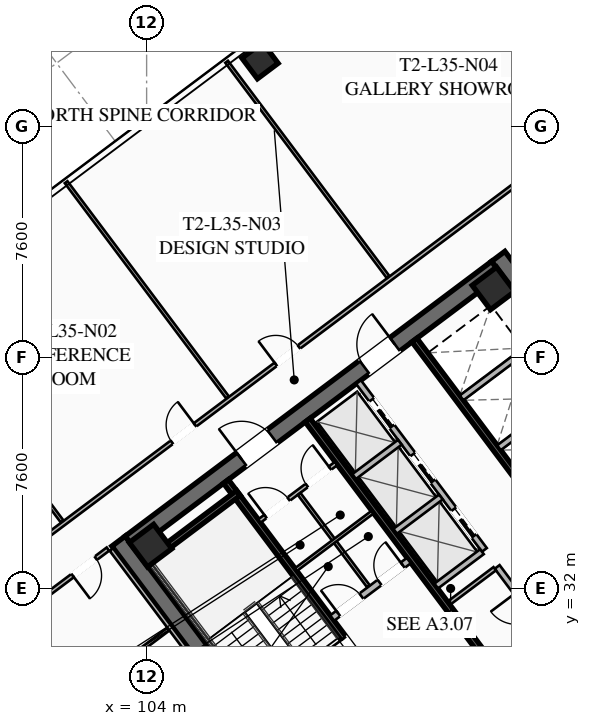
"""IFC4 building model, lengths in metres.
Left out: names, types, materials, properties, quantities, classifications, styles, units other than length and angle.
Written with IfcOpenShell. Run it as: python <this file> out.ifc"""

import sys

from ifc_helpers import new_model, si_unit, direction, frame, frame_2d, origin, origin_2d, place, context, subcontext, project, spatial, rectangle, hollow_rectangle, extrude, element, fill, save


model = new_model("IFC4")
c1 = context("Model", 3, precision=1e-05, world=origin(), true_north=direction((0.0, 1.0)))
c2 = subcontext(c1, "Body", "Model", "MODEL_VIEW")
j1 = project(units=[si_unit("LENGTHUNIT", "METRE"), si_unit("PLANEANGLEUNIT", "RADIAN")], contexts=[c1])
p1 = place(None, origin())
s1 = spatial("IfcSite", under=j1, at=p1, CompositionType="ELEMENT")
p2 = place(p1, origin())
s2 = spatial("IfcBuilding", under=s1, at=p2, CompositionType="ELEMENT")
p3 = place(p2, frame((0.0, 0.0, 132.15)))
s3 = spatial("IfcBuildingStorey", under=s2, at=p3, CompositionType="ELEMENT", Elevation=132.15)
for number, where, z_axis, x_axis in (
    (1, (112.436, 21.077, 0.0), (0.0, 0.0, 1.0), (-0.6, 0.8, 0.0)),
    (2, (115.564, 42.923, 0.0), (0.0, 0.0, 1.0), (0.6, -0.8, 0.0)),
):
    element("IfcWall", number, at=place(p3, frame(where, z_axis=z_axis, x_axis=x_axis)), inside=s3, PredefinedType="SHEAR", context=c2, shape_type="SweptSolid", body=[
        extrude(rectangle(XDim=15.6, YDim=0.55, at=frame_2d((7.8, 0.0))), origin(), (0.0, 0.0, 1.0), 3.55),
    ])
p4 = place(p3, frame((124.539, 30.498, 0.0), z_axis=(0.0, 0.0, 1.0), x_axis=(-0.799998054672, -0.600002593761, 0.0)))
e3 = element("IfcWall", 3, at=p4, inside=s3, PredefinedType="SHEAR", context=c2, shape_type="SweptSolid", body=[
    extrude(rectangle(XDim=15.06, YDim=0.55, at=frame_2d((7.53, 0.0))), origin(), (0.0, 0.0, 1.0), 3.55),
])
p5 = place(p4, frame((9.23, 0.0, 0.0)))
e4 = element("IfcOpeningElement", 4, at=p5, cuts=e3, PredefinedType="OPENING", context=c2, shape_type="SweptSolid", body=[
    extrude(rectangle(XDim=1.25, YDim=2.25, at=frame_2d((0.625, 1.125))), frame((0.0, 0.285, 0.0), z_axis=(0.0, -1.0, 0.0), x_axis=(1.0, 0.0, 0.0)), (0.0, 0.0, 1.0), 0.57),
])
p6 = place(p4, frame((4.18, 0.0, 0.0)))
e5 = element("IfcOpeningElement", 5, at=p6, cuts=e3, PredefinedType="OPENING", context=c2, shape_type="SweptSolid", body=[
    extrude(rectangle(XDim=1.25, YDim=2.25, at=frame_2d((0.625, 1.125))), frame((0.0, 0.285, 0.0), z_axis=(0.0, -1.0, 0.0), x_axis=(1.0, 0.0, 0.0)), (0.0, 0.0, 1.0), 0.57),
])
p7 = place(p3, frame((103.461, 33.502, 0.0), z_axis=(0.0, 0.0, 1.0), x_axis=(0.799998054672, 0.600002593761, 0.0)))
e6 = element("IfcWall", 6, at=p7, inside=s3, PredefinedType="SHEAR", context=c2, shape_type="SweptSolid", body=[
    extrude(rectangle(XDim=15.06, YDim=0.55, at=frame_2d((7.53, 0.0))), origin(), (0.0, 0.0, 1.0), 3.55),
])
p8 = place(p7, frame((4.58, 0.0, 0.0)))
e7 = element("IfcOpeningElement", 7, at=p8, cuts=e6, PredefinedType="OPENING", context=c2, shape_type="SweptSolid", body=[
    extrude(rectangle(XDim=1.25, YDim=2.25, at=frame_2d((0.625, 1.125))), frame((0.0, 0.285, 0.0), z_axis=(0.0, -1.0, 0.0), x_axis=(1.0, 0.0, 0.0)), (0.0, 0.0, 1.0), 0.57),
])
p9 = place(p7, frame((9.63, 0.0, 0.0)))
e8 = element("IfcOpeningElement", 8, at=p9, cuts=e6, PredefinedType="OPENING", context=c2, shape_type="SweptSolid", body=[
    extrude(rectangle(XDim=1.25, YDim=2.25, at=frame_2d((0.625, 1.125))), frame((0.0, 0.285, 0.0), z_axis=(0.0, -1.0, 0.0), x_axis=(1.0, 0.0, 0.0)), (0.0, 0.0, 1.0), 0.57),
])
for number, where, z_axis, x_axis in (
    (9, (115.41, 41.87, 0.0), (0.0, 0.0, 1.0), (0.8, 0.6, 0.0)),
    (10, (104.13, 33.41, 0.0), (0.0, 0.0, 1.0), (0.8, 0.6, 0.0)),
):
    element("IfcColumn", number, at=place(p3, frame(where, z_axis=z_axis, x_axis=x_axis)), inside=s3, PredefinedType="COLUMN", context=c2, shape_type="SweptSolid", body=[
        extrude(hollow_rectangle(XDim=1.0, YDim=1.0, WallThickness=0.04, at=origin_2d()), origin(), (0.0, 0.0, 1.0), 3.37),
    ])
p10 = place(p3, frame((107.73, 49.36, 0.0), z_axis=(0.0, 0.0, 1.0), x_axis=(0.799999996291, 0.600000004945, 0.0)))
e11 = element("IfcColumn", 11, at=p10, inside=s3, PredefinedType="COLUMN", context=c2, shape_type="SweptSolid", body=[
    extrude(hollow_rectangle(XDim=0.85, YDim=0.85, WallThickness=0.035, at=origin_2d()), origin(), (0.0, 0.0, 1.0), 3.37),
])
p11 = place(p3, frame((111.44, 29.08, 0.0), z_axis=(0.0, 0.0, 1.0), x_axis=(-0.59999029481, 0.8000072788, 0.0)))
e12 = element("IfcWall", 12, at=p11, inside=s3, PredefinedType="SHEAR", context=c2, shape_type="SweptSolid", body=[
    extrude(rectangle(XDim=8.05, YDim=0.2, at=frame_2d((4.025, 0.0))), origin(), (0.0, 0.0, 1.0), 3.37),
])
p12 = place(p11, frame((0.45, 0.0, 0.0)))
e13 = element("IfcOpeningElement", 13, at=p12, cuts=e12, PredefinedType="OPENING", context=c2, shape_type="SweptSolid", body=[
    extrude(rectangle(XDim=1.15, YDim=2.2, at=frame_2d((0.575, 1.1))), frame((0.0, 0.11, 0.0), z_axis=(0.0, -1.0, 0.0), x_axis=(1.0, 0.0, 0.0)), (0.0, 0.0, 1.0), 0.22),
])
p13 = place(p3, frame((103.956, 32.842, 0.0), z_axis=(0.0, 0.0, 1.0), x_axis=(0.800015298837, 0.599979601008, 0.0)))
e14 = element("IfcWall", 14, at=p13, inside=s3, PredefinedType="SHEAR", context=c2, shape_type="SweptSolid", body=[
    extrude(rectangle(XDim=3.83, YDim=0.2, at=frame_2d((1.915, 0.0))), origin(), (0.0, 0.0, 1.0), 3.37),
])
p14 = place(p3, frame((117.998, 25.936, 0.0), z_axis=(0.0, 0.0, 1.0), x_axis=(-0.600002693989, 0.799997979501, 0.0)))
e15 = element("IfcWall", 15, at=p14, inside=s3, PredefinedType="SHEAR", context=c2, shape_type="SweptSolid", body=[
    extrude(rectangle(XDim=14.5, YDim=0.2, at=frame_2d((7.25, 0.0))), origin(), (0.0, 0.0, 1.0), 3.37),
])
p15 = place(p3, frame((110.104, 31.028, 0.0), z_axis=(0.0, 0.0, 1.0), x_axis=(0.800018601094, 0.59997519774, 0.0)))
e16 = element("IfcWall", 16, at=p15, inside=s3, PredefinedType="SOLIDWALL", context=c2, shape_type="SweptSolid", body=[
    extrude(rectangle(XDim=3.15, YDim=0.22, at=frame_2d((1.575, 0.0))), origin(), (0.0, 0.0, 1.0), 2.723),
])
p16 = place(p15, frame((0.25, 0.0, 0.0)))
e17 = element("IfcOpeningElement", 17, at=p16, cuts=e16, PredefinedType="OPENING", context=c2, shape_type="SweptSolid", body=[
    extrude(rectangle(XDim=0.95, YDim=2.05, at=frame_2d((0.475, 1.025))), frame((0.0, 0.12, 0.0), z_axis=(0.0, -1.0, 0.0), x_axis=(1.0, 0.0, 0.0)), (0.0, 0.0, 1.0), 0.24),
])
p17 = place(p15, frame((1.95, 0.0, 0.0)))
e18 = element("IfcOpeningElement", 18, at=p17, cuts=e16, PredefinedType="OPENING", context=c2, shape_type="SweptSolid", body=[
    extrude(rectangle(XDim=0.95, YDim=2.05, at=frame_2d((0.475, 1.025))), frame((0.0, 0.12, 0.0), z_axis=(0.0, -1.0, 0.0), x_axis=(1.0, 0.0, 0.0)), (0.0, 0.0, 1.0), 0.24),
])
p18 = place(p3, frame((112.81, 40.17, 0.0), z_axis=(0.0, 0.0, 1.0), x_axis=(0.599993943644, -0.800004542231, 0.0)))
e19 = element("IfcWall", 19, at=p18, inside=s3, PredefinedType="SHEAR", context=c2, shape_type="SweptSolid", body=[
    extrude(rectangle(XDim=6.45, YDim=0.2, at=frame_2d((3.225, 0.0))), origin(), (0.0, 0.0, 1.0), 3.37),
])
for number, where, z_axis, x_axis in (
    (20, (115.59, 36.63, 0.0), (0.0, 0.0, 1.0), (0.8, 0.6, 0.0)),
    (21, (114.36, 38.27, 0.0), (0.0, 0.0, 1.0), (0.8, 0.6, 0.0)),
):
    element("IfcWall", number, at=place(p3, frame(where, z_axis=z_axis, x_axis=x_axis)), inside=s3, PredefinedType="SOLIDWALL", context=c2, shape_type="SweptSolid", body=[
        extrude(rectangle(XDim=3.48, YDim=0.2, at=frame_2d((1.74, 0.0))), origin(), (0.0, 0.0, 1.0), 3.37),
    ])
p19 = place(p3, frame((107.71, 34.22, 0.0), z_axis=(0.0, 0.0, 1.0), x_axis=(0.799981399002, 0.60002480053, 0.0)))
e22 = element("IfcWall", 22, at=p19, inside=s3, PredefinedType="PARTITIONING", context=c2, shape_type="SweptSolid", body=[
    extrude(rectangle(XDim=3.15, YDim=0.135, at=frame_2d((1.575, 0.0))), origin(), (0.0, 0.0, 1.0), 2.723),
])
p20 = place(p19, frame((0.25, 0.0, 0.0)))
e23 = element("IfcOpeningElement", 23, at=p20, cuts=e22, PredefinedType="OPENING", context=c2, shape_type="SweptSolid", body=[
    extrude(rectangle(XDim=0.95, YDim=2.05, at=frame_2d((0.475, 1.025))), frame((0.0, 0.077, 0.0), z_axis=(0.0, -1.0, 0.0), x_axis=(1.0, 0.0, 0.0)), (0.0, 0.0, 1.0), 0.155),
])
p21 = place(p19, frame((1.95, 0.0, 0.0)))
e24 = element("IfcOpeningElement", 24, at=p21, cuts=e22, PredefinedType="OPENING", context=c2, shape_type="SweptSolid", body=[
    extrude(rectangle(XDim=0.95, YDim=2.05, at=frame_2d((0.475, 1.025))), frame((0.0, 0.077, 0.0), z_axis=(0.0, -1.0, 0.0), x_axis=(1.0, 0.0, 0.0)), (0.0, 0.0, 1.0), 0.155),
])
p22 = place(p3, frame((111.296, 32.072, 0.0), z_axis=(0.0, 0.0, 1.0), x_axis=(-0.59995887973, 0.800030838552, 0.0)))
e25 = element("IfcWall", 25, at=p22, inside=s3, PredefinedType="PARTITIONING", context=c2, shape_type="SweptSolid", body=[
    extrude(rectangle(XDim=3.8, YDim=0.11, at=frame_2d((1.9, 0.0))), origin(), (0.0, 0.0, 1.0), 2.723),
])
p23 = place(p3, frame((108.91, 32.62, 0.0), z_axis=(0.0, 0.0, 1.0), x_axis=(0.800018601094, 0.59997519774, 0.0)))
e26 = element("IfcWall", 26, at=p23, inside=s3, PredefinedType="PARTITIONING", context=c2, shape_type="SweptSolid", body=[
    extrude(rectangle(XDim=3.15, YDim=0.11, at=frame_2d((1.575, 0.0))), origin(), (0.0, 0.0, 1.0), 2.723),
])
p24 = place(p3, frame((119.67, 27.19, 0.0), z_axis=(0.0, 0.0, 1.0), x_axis=(-0.599988677396, 0.800008491828, 0.0)))
e27 = element("IfcWall", 27, at=p24, inside=s3, PredefinedType="SOLIDWALL", context=c2, shape_type="SweptSolid", body=[
    extrude(rectangle(XDim=6.9, YDim=0.2, at=frame_2d((3.45, 0.0))), origin(), (0.0, 0.0, 1.0), 2.723),
])
p25 = place(p24, frame((0.85, 0.0, 0.0)))
e28 = element("IfcOpeningElement", 28, at=p25, cuts=e27, PredefinedType="OPENING", context=c2, shape_type="SweptSolid", body=[
    extrude(rectangle(XDim=0.95, YDim=2.05, at=frame_2d((0.475, 1.025))), frame((0.0, 0.11, 0.0), z_axis=(0.0, -1.0, 0.0), x_axis=(1.0, 0.0, 0.0)), (0.0, 0.0, 1.0), 0.22),
])
p26 = place(p24, frame((4.8, 0.0, 0.0)))
e29 = element("IfcOpeningElement", 29, at=p26, cuts=e27, PredefinedType="OPENING", context=c2, shape_type="SweptSolid", body=[
    extrude(rectangle(XDim=1.05, YDim=2.2, at=frame_2d((0.525, 1.1))), frame((0.0, 0.11, 0.0), z_axis=(0.0, -1.0, 0.0), x_axis=(1.0, 0.0, 0.0)), (0.0, 0.0, 1.0), 0.22),
])
p27 = place(p3, frame((113.946, 31.522, 0.0), z_axis=(0.0, 0.0, 1.0), x_axis=(0.8, 0.6, 0.0)))
e30 = element("IfcWall", 30, at=p27, inside=s3, PredefinedType="PARTITIONING", context=c2, shape_type="SweptSolid", body=[
    extrude(rectangle(XDim=1.88, YDim=0.135, at=frame_2d((0.94, 0.0))), origin(), (0.0, 0.0, 1.0), 2.723),
])
p28 = place(p3, frame((115.11, 33.27, 0.0), z_axis=(0.0, 0.0, 1.0), x_axis=(-0.600011322243, 0.799991508192, 0.0)))
e31 = element("IfcWall", 31, at=p28, inside=s3, PredefinedType="SOLIDWALL", context=c2, shape_type="SweptSolid", body=[
    extrude(rectangle(XDim=6.9, YDim=0.2, at=frame_2d((3.45, 0.0))), origin(), (0.0, 0.0, 1.0), 3.37),
])
p29 = place(p28, frame((0.575, 0.0, 0.0)))
e32 = element("IfcOpeningElement", 32, at=p29, cuts=e31, PredefinedType="OPENING", context=c2, shape_type="SweptSolid", body=[
    extrude(rectangle(XDim=1.1, YDim=2.2, at=frame_2d((0.55, 1.1))), frame((0.0, 0.11, 0.0), z_axis=(0.0, -1.0, 0.0), x_axis=(1.0, 0.0, 0.0)), (0.0, 0.0, 1.0), 0.22),
])
p30 = place(p28, frame((2.825, 0.0, 0.0)))
e33 = element("IfcOpeningElement", 33, at=p30, cuts=e31, PredefinedType="OPENING", context=c2, shape_type="SweptSolid", body=[
    extrude(rectangle(XDim=1.1, YDim=2.2, at=frame_2d((0.55, 1.1))), frame((0.0, 0.11, 0.0), z_axis=(0.0, -1.0, 0.0), x_axis=(1.0, 0.0, 0.0)), (0.0, 0.0, 1.0), 0.22),
])
p31 = place(p28, frame((5.075, 0.0, 0.0)))
e34 = element("IfcOpeningElement", 34, at=p31, cuts=e31, PredefinedType="OPENING", context=c2, shape_type="SweptSolid", body=[
    extrude(rectangle(XDim=1.1, YDim=2.2, at=frame_2d((0.55, 1.1))), frame((0.0, 0.11, 0.0), z_axis=(0.0, -1.0, 0.0), x_axis=(1.0, 0.0, 0.0)), (0.0, 0.0, 1.0), 0.22),
])
p32 = place(p3, frame((113.526, 32.082, 0.0), z_axis=(0.0, 0.0, 1.0), x_axis=(0.800046745961, 0.599937666993, 0.0)))
e35 = element("IfcWall", 35, at=p32, inside=s3, PredefinedType="SOLIDWALL", context=c2, shape_type="SweptSolid", body=[
    extrude(rectangle(XDim=1.88, YDim=0.2, at=frame_2d((0.94, 0.0))), origin(), (0.0, 0.0, 1.0), 3.37),
])
p33 = place(p3, frame((112.176, 33.882, 0.0), z_axis=(0.0, 0.0, 1.0), x_axis=(0.8, 0.6, 0.0)))
e36 = element("IfcWall", 36, at=p33, inside=s3, PredefinedType="SOLIDWALL", context=c2, shape_type="SweptSolid", body=[
    extrude(rectangle(XDim=1.88, YDim=0.2, at=frame_2d((0.94, 0.0))), origin(), (0.0, 0.0, 1.0), 3.37),
])
p34 = place(p3, frame((110.826, 35.682, 0.0), z_axis=(0.0, 0.0, 1.0), x_axis=(0.799984418148, 0.600020775241, 0.0)))
e37 = element("IfcWall", 37, at=p34, inside=s3, PredefinedType="SOLIDWALL", context=c2, shape_type="SweptSolid", body=[
    extrude(rectangle(XDim=1.88, YDim=0.2, at=frame_2d((0.94, 0.0))), origin(), (0.0, 0.0, 1.0), 3.37),
])
p35 = place(p3, frame((95.87, 30.09, 0.0), z_axis=(0.0, 0.0, 1.0), x_axis=(0.799997191971, 0.600003744021, 0.0)))
e38 = element("IfcWall", 38, at=p35, inside=s3, PredefinedType="PARTITIONING", context=c2, shape_type="SweptSolid", body=[
    extrude(rectangle(XDim=31.3, YDim=0.135, at=frame_2d((15.65, 0.0))), origin(), (0.0, 0.0, 1.0), 2.723),
])
p36 = place(p35, frame((0.3, 0.0, 0.0)))
e39 = element("IfcOpeningElement", 39, at=p36, cuts=e38, PredefinedType="OPENING", context=c2, shape_type="SweptSolid", body=[
    extrude(rectangle(XDim=0.95, YDim=2.05, at=frame_2d((0.475, 1.025))), frame((0.0, 0.077, 0.0), z_axis=(0.0, -1.0, 0.0), x_axis=(1.0, 0.0, 0.0)), (0.0, 0.0, 1.0), 0.155),
])
p37 = place(p35, frame((11.202, 0.0, 0.0)))
e40 = element("IfcOpeningElement", 40, at=p37, cuts=e38, PredefinedType="OPENING", context=c2, shape_type="SweptSolid", body=[
    extrude(rectangle(XDim=0.95, YDim=2.05, at=frame_2d((0.475, 1.025))), frame((0.0, 0.077, 0.0), z_axis=(0.0, -1.0, 0.0), x_axis=(1.0, 0.0, 0.0)), (0.0, 0.0, 1.0), 0.155),
])
p38 = place(p35, frame((15.474, 0.0, 0.0)))
e41 = element("IfcOpeningElement", 41, at=p38, cuts=e38, PredefinedType="OPENING", context=c2, shape_type="SweptSolid", body=[
    extrude(rectangle(XDim=0.95, YDim=2.05, at=frame_2d((0.475, 1.025))), frame((0.0, 0.077, 0.0), z_axis=(0.0, -1.0, 0.0), x_axis=(1.0, 0.0, 0.0)), (0.0, 0.0, 1.0), 0.155),
])
p39 = place(p35, frame((30.05, 0.0, 0.0)))
e42 = element("IfcOpeningElement", 42, at=p39, cuts=e38, PredefinedType="OPENING", context=c2, shape_type="SweptSolid", body=[
    extrude(rectangle(XDim=0.95, YDim=2.05, at=frame_2d((0.475, 1.025))), frame((0.0, 0.077, 0.0), z_axis=(0.0, -1.0, 0.0), x_axis=(1.0, 0.0, 0.0)), (0.0, 0.0, 1.0), 0.155),
])
p40 = place(p3, frame((101.222, 34.204, 0.0), z_axis=(0.0, 0.0, 1.0), x_axis=(-0.599995586027, 0.800003310461, 0.0)))
e43 = element("IfcWall", 43, at=p40, inside=s3, PredefinedType="PARTITIONING", context=c2, shape_type="SweptSolid", body=[
    extrude(rectangle(XDim=8.85, YDim=0.11, at=frame_2d((4.425, 0.0))), origin(), (0.0, 0.0, 1.0), 2.723),
])
p41 = place(p3, frame((106.662, 38.284, 0.0), z_axis=(0.0, 0.0, 1.0), x_axis=(-0.6, 0.8, 0.0)))
e44 = element("IfcWall", 44, at=p41, inside=s3, PredefinedType="PARTITIONING", context=c2, shape_type="SweptSolid", body=[
    extrude(rectangle(XDim=8.85, YDim=0.11, at=frame_2d((4.425, 0.0))), origin(), (0.0, 0.0, 1.0), 2.723),
])
p42 = place(p3, frame((111.942, 42.244, 0.0), z_axis=(0.0, 0.0, 1.0), x_axis=(-0.599982344389, 0.800013241404, 0.0)))
e45 = element("IfcWall", 45, at=p42, inside=s3, PredefinedType="PARTITIONING", context=c2, shape_type="SweptSolid", body=[
    extrude(rectangle(XDim=8.85, YDim=0.11, at=frame_2d((4.425, 0.0))), origin(), (0.0, 0.0, 1.0), 2.723),
])
p43 = place(p3, frame((132.832, 32.974, 0.0), z_axis=(0.0, 0.0, 1.0), x_axis=(-0.8, -0.6, 0.0)))
e46 = element("IfcWall", 46, at=p43, inside=s3, PredefinedType="PARTITIONING", context=c2, shape_type="SweptSolid", body=[
    extrude(rectangle(XDim=31.3, YDim=0.135, at=frame_2d((15.65, 0.0))), origin(), (0.0, 0.0, 1.0), 2.723),
])
p44 = place(p43, frame((29.97, 0.0, 0.0)))
e47 = element("IfcOpeningElement", 47, at=p44, cuts=e46, PredefinedType="OPENING", context=c2, shape_type="SweptSolid", body=[
    extrude(rectangle(XDim=0.95, YDim=2.05, at=frame_2d((0.475, 1.025))), frame((0.0, 0.077, 0.0), z_axis=(0.0, -1.0, 0.0), x_axis=(1.0, 0.0, 0.0)), (0.0, 0.0, 1.0), 0.155),
])
p45 = place(p43, frame((15.053, 0.0, 0.0)))
e48 = element("IfcOpeningElement", 48, at=p45, cuts=e46, PredefinedType="OPENING", context=c2, shape_type="SweptSolid", body=[
    extrude(rectangle(XDim=0.95, YDim=2.05, at=frame_2d((0.475, 1.025))), frame((0.0, 0.077, 0.0), z_axis=(0.0, -1.0, 0.0), x_axis=(1.0, 0.0, 0.0)), (0.0, 0.0, 1.0), 0.155),
])
p46 = place(p43, frame((0.38, 0.0, 0.0)))
e49 = element("IfcOpeningElement", 49, at=p46, cuts=e46, PredefinedType="OPENING", context=c2, shape_type="SweptSolid", body=[
    extrude(rectangle(XDim=0.95, YDim=2.05, at=frame_2d((0.475, 1.025))), frame((0.0, 0.077, 0.0), z_axis=(0.0, -1.0, 0.0), x_axis=(1.0, 0.0, 0.0)), (0.0, 0.0, 1.0), 0.155),
])
p47 = place(p3, frame((112.104, 20.928, 0.0), z_axis=(0.0, 0.0, 1.0), x_axis=(-0.599994940075, 0.800003794918, 0.0)))
e50 = element("IfcWall", 50, at=p47, inside=s3, PredefinedType="PARTITIONING", context=c2, shape_type="SweptSolid", body=[
    extrude(rectangle(XDim=15.44, YDim=0.135, at=frame_2d((7.72, 0.0))), origin(), (0.0, 0.0, 1.0), 2.723),
])
p48 = place(p3, frame((102.728, 33.296, 0.0), z_axis=(0.0, 0.0, 1.0), x_axis=(-0.800002918023, -0.599996109283, 0.0)))
e51 = element("IfcWall", 51, at=p48, inside=s3, PredefinedType="PARTITIONING", context=c2, shape_type="SweptSolid", body=[
    extrude(rectangle(XDim=10.04, YDim=0.135, at=frame_2d((5.02, 0.0))), origin(), (0.0, 0.0, 1.0), 2.723),
])
p49 = place(p48, frame((0.5, 0.0, 0.0)))
e52 = element("IfcOpeningElement", 52, at=p49, cuts=e51, PredefinedType="OPENING", context=c2, shape_type="SweptSolid", body=[
    extrude(rectangle(XDim=0.95, YDim=2.05, at=frame_2d((0.475, 1.025))), frame((0.0, 0.077, 0.0), z_axis=(0.0, -1.0, 0.0), x_axis=(1.0, 0.0, 0.0)), (0.0, 0.0, 1.0), 0.155),
])
p50 = place(p3, frame((96.676, 24.632, 0.0), z_axis=(0.0, 0.0, 1.0), x_axis=(0.800002918023, 0.599996109283, 0.0)))
e53 = element("IfcWall", 53, at=p50, inside=s3, PredefinedType="PARTITIONING", context=c2, shape_type="SweptSolid", body=[
    extrude(rectangle(XDim=10.04, YDim=0.11, at=frame_2d((5.02, 0.0))), origin(), (0.0, 0.0, 1.0), 2.723),
])
p51 = place(p8, origin())
e54 = element("IfcDoor", 54, at=p51, inside=s3, OperationType="SINGLE_SWING_LEFT", PredefinedType="DOOR", context=c2, shape_type="SweptSolid", body=[
    extrude(rectangle(XDim=1.25, YDim=2.25, at=frame_2d((0.625, 1.125))), frame((0.0, 0.025, 0.0), z_axis=(0.0, -1.0, 0.0), x_axis=(1.0, 0.0, 0.0)), (0.0, 0.0, 1.0), 0.05),
])
fill(e7, e54)
p52 = place(p9, origin())
e55 = element("IfcDoor", 55, at=p52, inside=s3, OperationType="SINGLE_SWING_RIGHT", PredefinedType="DOOR", context=c2, shape_type="SweptSolid", body=[
    extrude(rectangle(XDim=1.25, YDim=2.25, at=frame_2d((0.625, 1.125))), frame((0.0, 0.025, 0.0), z_axis=(0.0, -1.0, 0.0), x_axis=(1.0, 0.0, 0.0)), (0.0, 0.0, 1.0), 0.05),
])
fill(e8, e55)
p53 = place(p12, origin())
e56 = element("IfcDoor", 56, at=p53, inside=s3, OperationType="SINGLE_SWING_RIGHT", PredefinedType="DOOR", context=c2, shape_type="SweptSolid", body=[
    extrude(rectangle(XDim=1.15, YDim=2.2, at=frame_2d((0.575, 1.1))), frame((0.0, 0.025, 0.0), z_axis=(0.0, -1.0, 0.0), x_axis=(1.0, 0.0, 0.0)), (0.0, 0.0, 1.0), 0.05),
])
fill(e13, e56)
p54 = place(p20, origin())
e57 = element("IfcDoor", 57, at=p54, inside=s3, OperationType="SINGLE_SWING_LEFT", PredefinedType="DOOR", context=c2, shape_type="SweptSolid", body=[
    extrude(rectangle(XDim=0.95, YDim=2.05, at=frame_2d((0.475, 1.025))), frame((0.0, 0.025, 0.0), z_axis=(0.0, -1.0, 0.0), x_axis=(1.0, 0.0, 0.0)), (0.0, 0.0, 1.0), 0.05),
])
fill(e23, e57)
p55 = place(p21, origin())
e58 = element("IfcDoor", 58, at=p55, inside=s3, OperationType="SINGLE_SWING_RIGHT", PredefinedType="DOOR", context=c2, shape_type="SweptSolid", body=[
    extrude(rectangle(XDim=0.95, YDim=2.05, at=frame_2d((0.475, 1.025))), frame((0.0, 0.025, 0.0), z_axis=(0.0, -1.0, 0.0), x_axis=(1.0, 0.0, 0.0)), (0.0, 0.0, 1.0), 0.05),
])
fill(e24, e58)
p56 = place(p16, origin())
e59 = element("IfcDoor", 59, at=p56, inside=s3, OperationType="SINGLE_SWING_LEFT", PredefinedType="DOOR", context=c2, shape_type="SweptSolid", body=[
    extrude(rectangle(XDim=0.95, YDim=2.05, at=frame_2d((0.475, 1.025))), frame((0.0, 0.025, 0.0), z_axis=(0.0, -1.0, 0.0), x_axis=(1.0, 0.0, 0.0)), (0.0, 0.0, 1.0), 0.05),
])
fill(e17, e59)
p57 = place(p17, origin())
e60 = element("IfcDoor", 60, at=p57, inside=s3, OperationType="SINGLE_SWING_RIGHT", PredefinedType="DOOR", context=c2, shape_type="SweptSolid", body=[
    extrude(rectangle(XDim=0.95, YDim=2.05, at=frame_2d((0.475, 1.025))), frame((0.0, 0.025, 0.0), z_axis=(0.0, -1.0, 0.0), x_axis=(1.0, 0.0, 0.0)), (0.0, 0.0, 1.0), 0.05),
])
fill(e18, e60)
p58 = place(p37, origin())
e61 = element("IfcDoor", 61, at=p58, inside=s3, OperationType="SINGLE_SWING_RIGHT", PredefinedType="DOOR", context=c2, shape_type="SweptSolid", body=[
    extrude(rectangle(XDim=0.95, YDim=2.05, at=frame_2d((0.475, 1.025))), frame((0.0, 0.025, 0.0), z_axis=(0.0, -1.0, 0.0), x_axis=(1.0, 0.0, 0.0)), (0.0, 0.0, 1.0), 0.05),
])
fill(e40, e61)
p59 = place(p38, origin())
e62 = element("IfcDoor", 62, at=p59, inside=s3, OperationType="SINGLE_SWING_LEFT", PredefinedType="DOOR", context=c2, shape_type="SweptSolid", body=[
    extrude(rectangle(XDim=0.95, YDim=2.05, at=frame_2d((0.475, 1.025))), frame((0.0, 0.025, 0.0), z_axis=(0.0, -1.0, 0.0), x_axis=(1.0, 0.0, 0.0)), (0.0, 0.0, 1.0), 0.05),
])
fill(e41, e62)
p60 = place(p49, origin())
e63 = element("IfcDoor", 63, at=p60, inside=s3, OperationType="SINGLE_SWING_RIGHT", PredefinedType="DOOR", context=c2, shape_type="SweptSolid", body=[
    extrude(rectangle(XDim=0.95, YDim=2.05, at=frame_2d((0.475, 1.025))), frame((0.0, 0.025, 0.0), z_axis=(0.0, -1.0, 0.0), x_axis=(1.0, 0.0, 0.0)), (0.0, 0.0, 1.0), 0.05),
])
fill(e52, e63)
p61 = place(p29, origin())
e64 = element("IfcDoor", 64, at=p61, inside=s3, OperationType="SLIDING_TO_LEFT", PredefinedType="DOOR", context=c2, shape_type="SweptSolid", body=[
    extrude(rectangle(XDim=1.1, YDim=2.2, at=frame_2d((0.55, 1.1))), frame((0.0, 0.025, 0.0), z_axis=(0.0, -1.0, 0.0), x_axis=(1.0, 0.0, 0.0)), (0.0, 0.0, 1.0), 0.05),
])
fill(e32, e64)
p62 = place(p30, origin())
e65 = element("IfcDoor", 65, at=p62, inside=s3, OperationType="SLIDING_TO_LEFT", PredefinedType="DOOR", context=c2, shape_type="SweptSolid", body=[
    extrude(rectangle(XDim=1.1, YDim=2.2, at=frame_2d((0.55, 1.1))), frame((0.0, 0.025, 0.0), z_axis=(0.0, -1.0, 0.0), x_axis=(1.0, 0.0, 0.0)), (0.0, 0.0, 1.0), 0.05),
])
fill(e33, e65)
p63 = place(p31, origin())
e66 = element("IfcDoor", 66, at=p63, inside=s3, OperationType="SLIDING_TO_LEFT", PredefinedType="DOOR", context=c2, shape_type="SweptSolid", body=[
    extrude(rectangle(XDim=1.1, YDim=2.2, at=frame_2d((0.55, 1.1))), frame((0.0, 0.025, 0.0), z_axis=(0.0, -1.0, 0.0), x_axis=(1.0, 0.0, 0.0)), (0.0, 0.0, 1.0), 0.05),
])
fill(e34, e66)
save(model, sys.argv[1])
